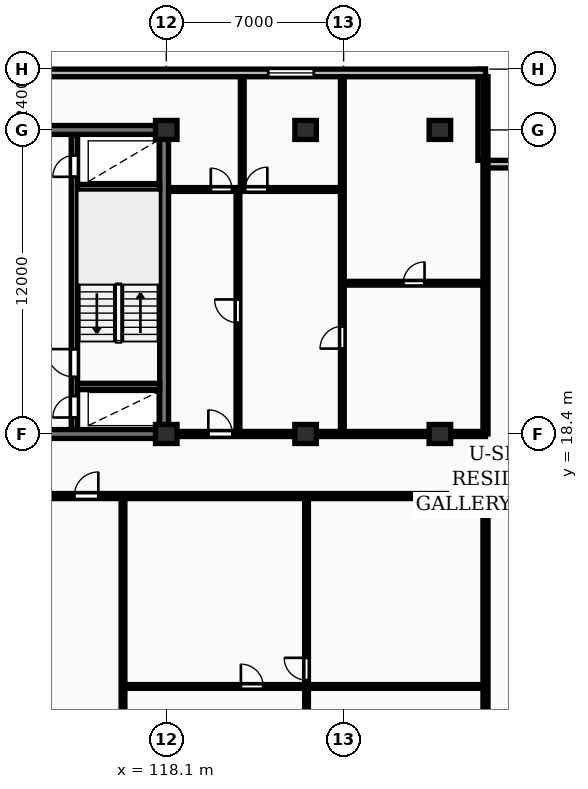
"""IFC4 building model, lengths in metres.
Left out: names, types, materials, properties, quantities, classifications, styles, units other than length and angle.
Written with IfcOpenShell. Run it as: python <this file> out.ifc"""

import sys

from ifc_helpers import new_model, si_unit, direction, frame, frame_2d, origin, origin_2d, place, context, subcontext, project, spatial, rectangle, extrude, element, fill, save


model = new_model("IFC4")
c1 = context("Model", 3, precision=1e-05, world=origin(), true_north=direction((0.0, 1.0)))
c2 = subcontext(c1, "Body", "Model", "MODEL_VIEW")
j1 = project(units=[si_unit("LENGTHUNIT", "METRE"), si_unit("PLANEANGLEUNIT", "RADIAN")], contexts=[c1])
p1 = place(None, origin())
s1 = spatial("IfcSite", under=j1, at=p1, CompositionType="ELEMENT")
p2 = place(p1, origin())
s2 = spatial("IfcBuilding", under=s1, at=p2, CompositionType="ELEMENT")
p3 = place(p2, frame((0.0, 0.0, 119.8)))
s3 = spatial("IfcBuildingStorey", under=s2, at=p3, CompositionType="ELEMENT", Elevation=119.8)
for number, where, z_axis, x_axis in (
    (1, (118.1, 18.4, 0.0), (0.0, 0.0, 1.0), (1.0, 0.0, 0.0)),
    (2, (118.1, 30.4, 0.0), (0.0, 0.0, 1.0), (1.0, 0.0, 0.0)),
    (3, (123.6, 18.4, 0.0), (0.0, 0.0, 1.0), (1.0, 0.0, 0.0)),
    (4, (123.6, 30.4, 0.0), (0.0, 0.0, 1.0), (1.0, 0.0, 0.0)),
    (5, (128.9, 18.4, 0.0), (0.0, 0.0, 1.0), (1.0, 0.0, 0.0)),
    (6, (128.9, 30.4, 0.0), (0.0, 0.0, 1.0), (1.0, 0.0, 0.0)),
):
    element("IfcColumn", number, at=place(p3, frame(where, z_axis=z_axis, x_axis=x_axis)), inside=s3, PredefinedType="COLUMN", context=c2, shape_type="SweptSolid", body=[
        extrude(rectangle(XDim=0.85, YDim=0.75, at=origin_2d()), origin(), (0.0, 0.0, 1.0), 3.25),
    ])
for number, where, z_axis, x_axis in (
    (7, (134.3, 29.05, 0.0), (0.0, 0.0, 1.0), (-1.0, 0.0, 0.0)),
    (8, (130.55, 29.2, 0.0), (0.0, 0.0, 1.0), (0.0, 1.0, 0.0)),
):
    element("IfcWall", number, at=place(p3, frame(where, z_axis=z_axis, x_axis=x_axis)), inside=s3, PredefinedType="STANDARD", context=c2, shape_type="SweptSolid", body=[
        extrude(rectangle(XDim=3.6, YDim=0.3, at=frame_2d((1.8, 0.0))), origin(), (0.0, 0.0, 1.0), 2.97),
    ])
p4 = place(p3, frame((130.7, 32.65, 0.0), z_axis=(0.0, 0.0, 1.0), x_axis=(-1.0, 0.0, 0.0)))
e9 = element("IfcWall", 9, at=p4, inside=s3, PredefinedType="STANDARD", context=c2, shape_type="SweptSolid", body=[
    extrude(rectangle(XDim=58.0, YDim=0.3, at=frame_2d((29.0, 0.0))), origin(), (0.0, 0.0, 1.0), 2.97),
])
p5 = place(p4, frame((50.125, 0.0, 0.85)))
e10 = element("IfcOpeningElement", 10, at=p5, cuts=e9, PredefinedType="OPENING", context=c2, shape_type="SweptSolid", body=[
    extrude(rectangle(XDim=1.8, YDim=1.8, at=frame_2d((0.9, 0.9))), frame((0.0, 0.16, 0.0), z_axis=(0.0, -1.0, 0.0), x_axis=(1.0, 0.0, 0.0)), (0.0, 0.0, 1.0), 0.32),
])
p6 = place(p4, frame((6.775, 0.0, 0.85)))
e11 = element("IfcOpeningElement", 11, at=p6, cuts=e9, PredefinedType="OPENING", context=c2, shape_type="SweptSolid", body=[
    extrude(rectangle(XDim=1.8, YDim=1.8, at=frame_2d((0.9, 0.9))), frame((0.0, 0.16, 0.0), z_axis=(0.0, -1.0, 0.0), x_axis=(1.0, 0.0, 0.0)), (0.0, 0.0, 1.0), 0.32),
])
p7 = place(p3, frame((81.925, 30.4, 0.0), z_axis=(0.0, 0.0, 1.0), x_axis=(1.0, 0.0, 0.0)))
e12 = element("IfcWall", 12, at=p7, inside=s3, PredefinedType="SHEAR", context=c2, shape_type="SweptSolid", body=[
    extrude(rectangle(XDim=36.265, YDim=0.35, at=frame_2d((18.132, 0.0))), origin(), (0.0, 0.0, 1.0), 3.25),
])
p8 = place(p3, frame((118.015, 18.575, 0.0), z_axis=(0.0, 0.0, 1.0), x_axis=(0.0, 1.0, 0.0)))
e13 = element("IfcWall", 13, at=p8, inside=s3, PredefinedType="SHEAR", context=c2, shape_type="SweptSolid", body=[
    extrude(rectangle(XDim=11.65, YDim=0.35, at=frame_2d((5.825, 0.0))), origin(), (0.0, 0.0, 1.0), 3.25),
])
p9 = place(p3, frame((81.925, 18.4, 0.0), z_axis=(0.0, 0.0, 1.0), x_axis=(1.0, 0.0, 0.0)))
e14 = element("IfcWall", 14, at=p9, inside=s3, PredefinedType="SHEAR", context=c2, shape_type="SweptSolid", body=[
    extrude(rectangle(XDim=36.265, YDim=0.35, at=frame_2d((18.132, 0.0))), origin(), (0.0, 0.0, 1.0), 3.25),
])
p10 = place(p9, frame((5.675, 0.0, 0.0)))
e15 = element("IfcOpeningElement", 15, at=p10, cuts=e14, PredefinedType="OPENING", context=c2, shape_type="SweptSolid", body=[
    extrude(rectangle(XDim=1.0, YDim=2.15, at=frame_2d((0.5, 1.075))), frame((0.0, 0.185, 0.0), z_axis=(0.0, -1.0, 0.0), x_axis=(1.0, 0.0, 0.0)), (0.0, 0.0, 1.0), 0.37),
])
p11 = place(p9, frame((21.925, 0.0, 0.0)))
e16 = element("IfcOpeningElement", 16, at=p11, cuts=e14, PredefinedType="OPENING", context=c2, shape_type="SweptSolid", body=[
    extrude(rectangle(XDim=1.5, YDim=2.2, at=frame_2d((0.75, 1.1))), frame((0.0, 0.185, 0.0), z_axis=(0.0, -1.0, 0.0), x_axis=(1.0, 0.0, 0.0)), (0.0, 0.0, 1.0), 0.37),
])
p12 = place(p9, frame((29.875, 0.0, 0.0)))
e17 = element("IfcOpeningElement", 17, at=p12, cuts=e14, PredefinedType="OPENING", context=c2, shape_type="SweptSolid", body=[
    extrude(rectangle(XDim=1.0, YDim=2.15, at=frame_2d((0.5, 1.075))), frame((0.0, 0.185, 0.0), z_axis=(0.0, -1.0, 0.0), x_axis=(1.0, 0.0, 0.0)), (0.0, 0.0, 1.0), 0.37),
])
p13 = place(p3, frame((114.475, 18.6, 0.0), z_axis=(0.0, 0.0, 1.0), x_axis=(0.0, 1.0, 0.0)))
e18 = element("IfcWall", 18, at=p13, inside=s3, PredefinedType="SHEAR", context=c2, shape_type="SweptSolid", body=[
    extrude(rectangle(XDim=11.6, YDim=0.25, at=frame_2d((5.8, 0.0))), origin(), (0.0, 0.0, 1.0), 3.25),
])
p14 = place(p13, frame((0.45, 0.0, 0.0)))
e19 = element("IfcOpeningElement", 19, at=p14, cuts=e18, PredefinedType="OPENING", context=c2, shape_type="SweptSolid", body=[
    extrude(rectangle(XDim=0.85, YDim=2.05, at=frame_2d((0.425, 1.025))), frame((0.0, 0.135, 0.0), z_axis=(0.0, -1.0, 0.0), x_axis=(1.0, 0.0, 0.0)), (0.0, 0.0, 1.0), 0.27),
])
p15 = place(p13, frame((2.05, 0.0, 0.0)))
e20 = element("IfcOpeningElement", 20, at=p15, cuts=e18, PredefinedType="OPENING", context=c2, shape_type="SweptSolid", body=[
    extrude(rectangle(XDim=1.1, YDim=2.1, at=frame_2d((0.55, 1.05))), frame((0.0, 0.135, 0.0), z_axis=(0.0, -1.0, 0.0), x_axis=(1.0, 0.0, 0.0)), (0.0, 0.0, 1.0), 0.27),
])
p16 = place(p13, frame((9.95, 0.0, 0.0)))
e21 = element("IfcOpeningElement", 21, at=p16, cuts=e18, PredefinedType="OPENING", context=c2, shape_type="SweptSolid", body=[
    extrude(rectangle(XDim=0.85, YDim=2.05, at=frame_2d((0.425, 1.025))), frame((0.0, 0.135, 0.0), z_axis=(0.0, -1.0, 0.0), x_axis=(1.0, 0.0, 0.0)), (0.0, 0.0, 1.0), 0.27),
])
for number, where, z_axis, x_axis in (
    (22, (114.6, 20.275, 0.0), (0.0, 0.0, 1.0), (1.0, 0.0, 0.0)),
    (23, (114.6, 28.125, 0.0), (0.0, 0.0, 1.0), (1.0, 0.0, 0.0)),
):
    element("IfcWall", number, at=place(p3, frame(where, z_axis=z_axis, x_axis=x_axis)), inside=s3, PredefinedType="SHEAR", context=c2, shape_type="SweptSolid", body=[
        extrude(rectangle(XDim=3.24, YDim=0.25, at=frame_2d((1.62, 0.0))), origin(), (0.0, 0.0, 1.0), 3.25),
    ])
p17 = place(p3, frame((130.7, 18.4, 0.0), z_axis=(0.0, 0.0, 1.0), x_axis=(0.0, 1.0, 0.0)))
e24 = element("IfcWall", 24, at=p17, inside=s3, PredefinedType="PARTITIONING", context=c2, shape_type="SweptSolid", body=[
    extrude(rectangle(XDim=14.1, YDim=0.2, at=frame_2d((7.05, 0.0))), origin(), (0.0, 0.0, 1.0), 2.97),
])
p18 = place(p3, frame((125.05, 24.35, 0.0), z_axis=(0.0, 0.0, 1.0), x_axis=(1.0, 0.0, 0.0)))
e25 = element("IfcWall", 25, at=p18, inside=s3, PredefinedType="PARTITIONING", context=c2, shape_type="SweptSolid", body=[
    extrude(rectangle(XDim=5.65, YDim=0.15, at=frame_2d((2.825, 0.0))), origin(), (0.0, 0.0, 1.0), 2.97),
])
p19 = place(p18, frame((2.405, 0.0, 0.0)))
e26 = element("IfcOpeningElement", 26, at=p19, cuts=e25, PredefinedType="OPENING", context=c2, shape_type="SweptSolid", body=[
    extrude(rectangle(XDim=0.84, YDim=2.04, at=frame_2d((0.42, 1.02))), frame((0.0, 0.085, 0.0), z_axis=(0.0, -1.0, 0.0), x_axis=(1.0, 0.0, 0.0)), (0.0, 0.0, 1.0), 0.17),
])
p20 = place(p3, frame((125.05, 18.45, 0.0), z_axis=(0.0, 0.0, 1.0), x_axis=(0.0, 1.0, 0.0)))
e27 = element("IfcWall", 27, at=p20, inside=s3, PredefinedType="PARTITIONING", context=c2, shape_type="SweptSolid", body=[
    extrude(rectangle(XDim=14.05, YDim=0.15, at=frame_2d((7.025, 0.0))), origin(), (0.0, 0.0, 1.0), 2.97),
])
p21 = place(p20, frame((3.32, 0.0, 0.0)))
e28 = element("IfcOpeningElement", 28, at=p21, cuts=e27, PredefinedType="OPENING", context=c2, shape_type="SweptSolid", body=[
    extrude(rectangle(XDim=0.88, YDim=2.06, at=frame_2d((0.44, 1.03))), frame((0.0, 0.085, 0.0), z_axis=(0.0, -1.0, 0.0), x_axis=(1.0, 0.0, 0.0)), (0.0, 0.0, 1.0), 0.17),
])
p22 = place(p3, frame((120.93, 18.45, 0.0), z_axis=(0.0, 0.0, 1.0), x_axis=(0.0, 1.0, 0.0)))
e29 = element("IfcWall", 29, at=p22, inside=s3, PredefinedType="PARTITIONING", context=c2, shape_type="SweptSolid", body=[
    extrude(rectangle(XDim=9.6, YDim=0.15, at=frame_2d((4.8, 0.0))), origin(), (0.0, 0.0, 1.0), 2.97),
])
p23 = place(p22, frame((4.34, 0.0, 0.0)))
e30 = element("IfcOpeningElement", 30, at=p23, cuts=e29, PredefinedType="OPENING", context=c2, shape_type="SweptSolid", body=[
    extrude(rectangle(XDim=0.92, YDim=2.08, at=frame_2d((0.46, 1.04))), frame((0.0, 0.085, 0.0), z_axis=(0.0, -1.0, 0.0), x_axis=(1.0, 0.0, 0.0)), (0.0, 0.0, 1.0), 0.17),
])
p24 = place(p3, frame((121.1, 28.05, 0.0), z_axis=(0.0, 0.0, 1.0), x_axis=(0.0, 1.0, 0.0)))
e31 = element("IfcWall", 31, at=p24, inside=s3, PredefinedType="PARTITIONING", context=c2, shape_type="SweptSolid", body=[
    extrude(rectangle(XDim=4.45, YDim=0.15, at=frame_2d((2.225, 0.0))), origin(), (0.0, 0.0, 1.0), 2.97),
])
p25 = place(p3, frame((118.27, 28.05, 0.0), z_axis=(0.0, 0.0, 1.0), x_axis=(1.0, 0.0, 0.0)))
e32 = element("IfcWall", 32, at=p25, inside=s3, PredefinedType="PARTITIONING", context=c2, shape_type="SweptSolid", body=[
    extrude(rectangle(XDim=6.76, YDim=0.15, at=frame_2d((3.38, 0.0))), origin(), (0.0, 0.0, 1.0), 2.97),
])
p26 = place(p25, frame((1.587, 0.0, 0.0)))
e33 = element("IfcOpeningElement", 33, at=p26, cuts=e32, PredefinedType="OPENING", context=c2, shape_type="SweptSolid", body=[
    extrude(rectangle(XDim=0.84, YDim=2.04, at=frame_2d((0.42, 1.02))), frame((0.0, 0.085, 0.0), z_axis=(0.0, -1.0, 0.0), x_axis=(1.0, 0.0, 0.0)), (0.0, 0.0, 1.0), 0.17),
])
p27 = place(p25, frame((2.94, 0.0, 0.0)))
e34 = element("IfcOpeningElement", 34, at=p27, cuts=e32, PredefinedType="OPENING", context=c2, shape_type="SweptSolid", body=[
    extrude(rectangle(XDim=0.88, YDim=2.06, at=frame_2d((0.44, 1.03))), frame((0.0, 0.085, 0.0), z_axis=(0.0, -1.0, 0.0), x_axis=(1.0, 0.0, 0.0)), (0.0, 0.0, 1.0), 0.17),
])
p28 = place(p3, frame((118.25, 18.4, 0.0), z_axis=(0.0, 0.0, 1.0), x_axis=(1.0, 0.0, 0.0)))
e35 = element("IfcWall", 35, at=p28, inside=s3, PredefinedType="PARTITIONING", context=c2, shape_type="SweptSolid", body=[
    extrude(rectangle(XDim=12.45, YDim=0.2, at=frame_2d((6.225, 0.0))), origin(), (0.0, 0.0, 1.0), 2.358),
])
p29 = place(p28, frame((1.51, 0.0, 0.0)))
e36 = element("IfcOpeningElement", 36, at=p29, cuts=e35, PredefinedType="OPENING", context=c2, shape_type="SweptSolid", body=[
    extrude(rectangle(XDim=0.95, YDim=2.15, at=frame_2d((0.475, 1.075))), frame((0.0, 0.11, 0.0), z_axis=(0.0, -1.0, 0.0), x_axis=(1.0, 0.0, 0.0)), (0.0, 0.0, 1.0), 0.22),
])
p30 = place(p3, frame((130.7, -8.7, 0.0), z_axis=(0.0, 0.0, 1.0), x_axis=(0.0, 1.0, 0.0)))
e37 = element("IfcWall", 37, at=p30, inside=s3, PredefinedType="PARTITIONING", context=c2, shape_type="SweptSolid", body=[
    extrude(rectangle(XDim=24.57, YDim=0.2, at=frame_2d((12.285, 0.0))), origin(), (0.0, 0.0, 1.0), 2.97),
])
p31 = place(p3, frame((123.636, 1.34, 0.0), z_axis=(0.0, 0.0, 1.0), x_axis=(0.0, 1.0, 0.0)))
e38 = element("IfcWall", 38, at=p31, inside=s3, PredefinedType="PARTITIONING", context=c2, shape_type="SweptSolid", body=[
    extrude(rectangle(XDim=14.55, YDim=0.15, at=frame_2d((7.275, 0.0))), origin(), (0.0, 0.0, 1.0), 2.2),
])
p32 = place(p31, frame((2.951, 0.0, 0.0)))
e39 = element("IfcOpeningElement", 39, at=p32, cuts=e38, PredefinedType="OPENING", context=c2, shape_type="SweptSolid", body=[
    extrude(rectangle(XDim=0.84, YDim=2.04, at=frame_2d((0.42, 1.02))), frame((0.0, 0.085, 0.0), z_axis=(0.0, -1.0, 0.0), x_axis=(1.0, 0.0, 0.0)), (0.0, 0.0, 1.0), 0.17),
])
p33 = place(p31, frame((7.345, 0.0, 0.0)))
e40 = element("IfcOpeningElement", 40, at=p33, cuts=e38, PredefinedType="OPENING", context=c2, shape_type="SweptSolid", body=[
    extrude(rectangle(XDim=0.88, YDim=2.06, at=frame_2d((0.44, 1.03))), frame((0.0, 0.085, 0.0), z_axis=(0.0, -1.0, 0.0), x_axis=(1.0, 0.0, 0.0)), (0.0, 0.0, 1.0), 0.17),
])
p34 = place(p3, frame((116.453, 8.435, 0.0), z_axis=(0.0, 0.0, 1.0), x_axis=(1.0, 0.0, 0.0)))
e41 = element("IfcWall", 41, at=p34, inside=s3, PredefinedType="PARTITIONING", context=c2, shape_type="SweptSolid", body=[
    extrude(rectangle(XDim=14.167, YDim=0.15, at=frame_2d((7.084, 0.0))), origin(), (0.0, 0.0, 1.0), 2.97),
])
p35 = place(p34, frame((4.593, 0.0, 0.0)))
e42 = element("IfcOpeningElement", 42, at=p35, cuts=e41, PredefinedType="OPENING", context=c2, shape_type="SweptSolid", body=[
    extrude(rectangle(XDim=0.88, YDim=2.06, at=frame_2d((0.44, 1.03))), frame((0.0, 0.085, 0.0), z_axis=(0.0, -1.0, 0.0), x_axis=(1.0, 0.0, 0.0)), (0.0, 0.0, 1.0), 0.17),
])
p36 = place(p3, frame((116.393, 1.34, 0.0), z_axis=(0.0, 0.0, 1.0), x_axis=(0.0, 1.0, 0.0)))
e43 = element("IfcWall", 43, at=p36, inside=s3, PredefinedType="PARTITIONING", context=c2, shape_type="SweptSolid", body=[
    extrude(rectangle(XDim=14.55, YDim=0.15, at=frame_2d((7.275, 0.0))), origin(), (0.0, 0.0, 1.0), 2.97),
])
p37 = place(p36, frame((2.933, 0.0, 0.0)))
e44 = element("IfcOpeningElement", 44, at=p37, cuts=e43, PredefinedType="OPENING", context=c2, shape_type="SweptSolid", body=[
    extrude(rectangle(XDim=0.88, YDim=2.06, at=frame_2d((0.44, 1.03))), frame((0.0, 0.085, 0.0), z_axis=(0.0, -1.0, 0.0), x_axis=(1.0, 0.0, 0.0)), (0.0, 0.0, 1.0), 0.17),
])
p38 = place(p3, frame((72.7, 15.95, 0.0), z_axis=(0.0, 0.0, 1.0), x_axis=(1.0, 0.0, 0.0)))
e45 = element("IfcWall", 45, at=p38, inside=s3, PredefinedType="PARTITIONING", context=c2, shape_type="SweptSolid", body=[
    extrude(rectangle(XDim=58.0, YDim=0.2, at=frame_2d((29.0, 0.0))), origin(), (0.0, 0.0, 1.0), 2.97),
])
p39 = place(p38, frame((6.39, 0.0, 0.0)))
e46 = element("IfcOpeningElement", 46, at=p39, cuts=e45, PredefinedType="OPENING", context=c2, shape_type="SweptSolid", body=[
    extrude(rectangle(XDim=1.22, YDim=2.18, at=frame_2d((0.61, 1.09))), frame((0.0, 0.11, 0.0), z_axis=(0.0, -1.0, 0.0), x_axis=(1.0, 0.0, 0.0)), (0.0, 0.0, 1.0), 0.22),
])
p40 = place(p38, frame((22.436, 0.0, 0.0)))
e47 = element("IfcOpeningElement", 47, at=p40, cuts=e45, PredefinedType="OPENING", context=c2, shape_type="SweptSolid", body=[
    extrude(rectangle(XDim=0.95, YDim=2.15, at=frame_2d((0.475, 1.075))), frame((0.0, 0.11, 0.0), z_axis=(0.0, -1.0, 0.0), x_axis=(1.0, 0.0, 0.0)), (0.0, 0.0, 1.0), 0.22),
])
p41 = place(p38, frame((41.768, 0.0, 0.0)))
e48 = element("IfcOpeningElement", 48, at=p41, cuts=e45, PredefinedType="OPENING", context=c2, shape_type="SweptSolid", body=[
    extrude(rectangle(XDim=0.95, YDim=2.15, at=frame_2d((0.475, 1.075))), frame((0.0, 0.11, 0.0), z_axis=(0.0, -1.0, 0.0), x_axis=(1.0, 0.0, 0.0)), (0.0, 0.0, 1.0), 0.22),
])
p42 = place(p6, origin())
e49 = element("IfcWindow", 49, at=p42, inside=s3, PartitioningType="SINGLE_PANEL", PredefinedType="WINDOW", context=c2, shape_type="SweptSolid", body=[
    extrude(rectangle(XDim=1.8, YDim=1.8, at=frame_2d((0.9, 0.9))), frame((0.0, 0.03, 0.0), z_axis=(0.0, -1.0, 0.0), x_axis=(1.0, 0.0, 0.0)), (0.0, 0.0, 1.0), 0.06),
])
fill(e11, e49)
p43 = place(p14, origin())
e50 = element("IfcDoor", 50, at=p43, inside=s3, OperationType="SINGLE_SWING_LEFT", PredefinedType="DOOR", context=c2, shape_type="SweptSolid", body=[
    extrude(rectangle(XDim=0.85, YDim=2.05, at=frame_2d((0.425, 1.025))), frame((0.0, 0.025, 0.0), z_axis=(0.0, -1.0, 0.0), x_axis=(1.0, 0.0, 0.0)), (0.0, 0.0, 1.0), 0.05),
])
fill(e19, e50)
p44 = place(p15, origin())
e51 = element("IfcDoor", 51, at=p44, inside=s3, OperationType="SINGLE_SWING_RIGHT", PredefinedType="DOOR", context=c2, shape_type="SweptSolid", body=[
    extrude(rectangle(XDim=1.1, YDim=2.1, at=frame_2d((0.55, 1.05))), frame((0.0, 0.025, 0.0), z_axis=(0.0, -1.0, 0.0), x_axis=(1.0, 0.0, 0.0)), (0.0, 0.0, 1.0), 0.05),
])
fill(e20, e51)
p45 = place(p16, origin())
e52 = element("IfcDoor", 52, at=p45, inside=s3, OperationType="SINGLE_SWING_LEFT", PredefinedType="DOOR", context=c2, shape_type="SweptSolid", body=[
    extrude(rectangle(XDim=0.85, YDim=2.05, at=frame_2d((0.425, 1.025))), frame((0.0, 0.025, 0.0), z_axis=(0.0, -1.0, 0.0), x_axis=(1.0, 0.0, 0.0)), (0.0, 0.0, 1.0), 0.05),
])
fill(e21, e52)
p46 = place(p19, origin())
e53 = element("IfcDoor", 53, at=p46, inside=s3, OperationType="SINGLE_SWING_RIGHT", PredefinedType="DOOR", context=c2, shape_type="SweptSolid", body=[
    extrude(rectangle(XDim=0.84, YDim=2.04, at=frame_2d((0.42, 1.02))), frame((0.0, 0.025, 0.0), z_axis=(0.0, -1.0, 0.0), x_axis=(1.0, 0.0, 0.0)), (0.0, 0.0, 1.0), 0.05),
])
fill(e26, e53)
p47 = place(p21, origin())
e54 = element("IfcDoor", 54, at=p47, inside=s3, OperationType="SINGLE_SWING_LEFT", PredefinedType="DOOR", context=c2, shape_type="SweptSolid", body=[
    extrude(rectangle(XDim=0.88, YDim=2.06, at=frame_2d((0.44, 1.03))), frame((0.0, 0.025, 0.0), z_axis=(0.0, -1.0, 0.0), x_axis=(1.0, 0.0, 0.0)), (0.0, 0.0, 1.0), 0.05),
])
fill(e28, e54)
p48 = place(p23, origin())
e55 = element("IfcDoor", 55, at=p48, inside=s3, OperationType="SINGLE_SWING_RIGHT", PredefinedType="DOOR", context=c2, shape_type="SweptSolid", body=[
    extrude(rectangle(XDim=0.92, YDim=2.08, at=frame_2d((0.46, 1.04))), frame((0.0, 0.025, 0.0), z_axis=(0.0, -1.0, 0.0), x_axis=(1.0, 0.0, 0.0)), (0.0, 0.0, 1.0), 0.05),
])
fill(e30, e55)
p49 = place(p26, origin())
e56 = element("IfcDoor", 56, at=p49, inside=s3, OperationType="SINGLE_SWING_LEFT", PredefinedType="DOOR", context=c2, shape_type="SweptSolid", body=[
    extrude(rectangle(XDim=0.84, YDim=2.04, at=frame_2d((0.42, 1.02))), frame((0.0, 0.025, 0.0), z_axis=(0.0, -1.0, 0.0), x_axis=(1.0, 0.0, 0.0)), (0.0, 0.0, 1.0), 0.05),
])
fill(e33, e56)
p50 = place(p27, origin())
e57 = element("IfcDoor", 57, at=p50, inside=s3, OperationType="SINGLE_SWING_RIGHT", PredefinedType="DOOR", context=c2, shape_type="SweptSolid", body=[
    extrude(rectangle(XDim=0.88, YDim=2.06, at=frame_2d((0.44, 1.03))), frame((0.0, 0.025, 0.0), z_axis=(0.0, -1.0, 0.0), x_axis=(1.0, 0.0, 0.0)), (0.0, 0.0, 1.0), 0.05),
])
fill(e34, e57)
p51 = place(p29, origin())
e58 = element("IfcDoor", 58, at=p51, inside=s3, OperationType="SINGLE_SWING_LEFT", PredefinedType="DOOR", context=c2, shape_type="SweptSolid", body=[
    extrude(rectangle(XDim=0.95, YDim=2.15, at=frame_2d((0.475, 1.075))), frame((0.0, 0.025, 0.0), z_axis=(0.0, -1.0, 0.0), x_axis=(1.0, 0.0, 0.0)), (0.0, 0.0, 1.0), 0.05),
])
fill(e36, e58)
p52 = place(p33, origin())
e59 = element("IfcDoor", 59, at=p52, inside=s3, OperationType="SINGLE_SWING_RIGHT", PredefinedType="DOOR", context=c2, shape_type="SweptSolid", body=[
    extrude(rectangle(XDim=0.88, YDim=2.06, at=frame_2d((0.44, 1.03))), frame((0.0, 0.025, 0.0), z_axis=(0.0, -1.0, 0.0), x_axis=(1.0, 0.0, 0.0)), (0.0, 0.0, 1.0), 0.05),
])
fill(e40, e59)
p53 = place(p35, origin())
e60 = element("IfcDoor", 60, at=p53, inside=s3, OperationType="SINGLE_SWING_LEFT", PredefinedType="DOOR", context=c2, shape_type="SweptSolid", body=[
    extrude(rectangle(XDim=0.88, YDim=2.06, at=frame_2d((0.44, 1.03))), frame((0.0, 0.025, 0.0), z_axis=(0.0, -1.0, 0.0), x_axis=(1.0, 0.0, 0.0)), (0.0, 0.0, 1.0), 0.05),
])
fill(e42, e60)
p54 = place(p41, origin())
e61 = element("IfcDoor", 61, at=p54, inside=s3, OperationType="SINGLE_SWING_RIGHT", PredefinedType="DOOR", context=c2, shape_type="SweptSolid", body=[
    extrude(rectangle(XDim=0.95, YDim=2.15, at=frame_2d((0.475, 1.075))), frame((0.0, 0.025, 0.0), z_axis=(0.0, -1.0, 0.0), x_axis=(1.0, 0.0, 0.0)), (0.0, 0.0, 1.0), 0.05),
])
fill(e48, e61)
save(model, sys.argv[1])
